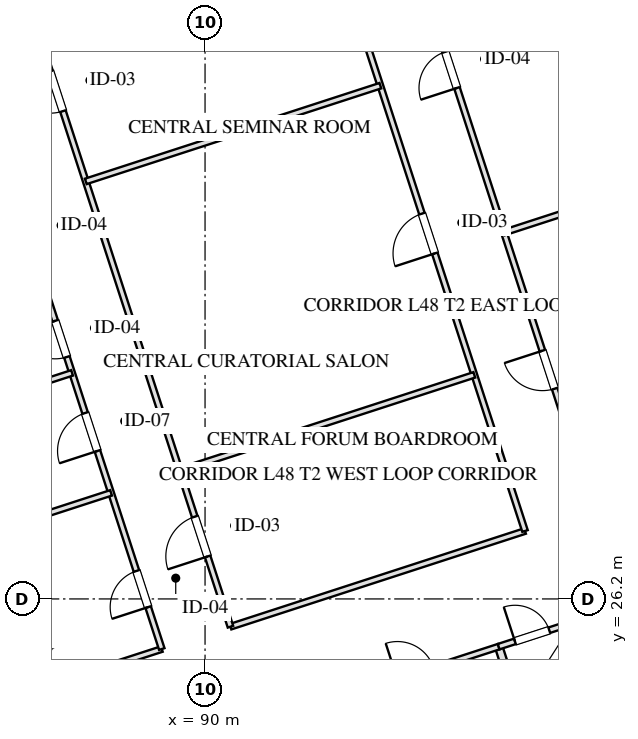
"""IFC4 building model, lengths in metres.
Left out: names, types, materials, properties, quantities, classifications, styles, units other than length and angle.
Written with IfcOpenShell. Run it as: python <this file> out.ifc"""

import sys

from ifc_helpers import new_model, si_unit, direction, frame, frame_2d, origin, place, context, subcontext, project, spatial, rectangle, extrude, element, fill, save


model = new_model("IFC4")
c1 = context("Model", 3, precision=1e-05, world=origin(), true_north=direction((0.0, 1.0)))
c2 = subcontext(c1, "Body", "Model", "MODEL_VIEW")
j1 = project(units=[si_unit("LENGTHUNIT", "METRE"), si_unit("PLANEANGLEUNIT", "RADIAN")], contexts=[c1])
p1 = place(None, origin())
s1 = spatial("IfcSite", under=j1, at=p1, CompositionType="ELEMENT")
p2 = place(p1, origin())
s2 = spatial("IfcBuilding", under=s1, at=p2, CompositionType="ELEMENT")
p3 = place(p2, frame((0.0, 0.0, 180.55)))
s3 = spatial("IfcBuildingStorey", under=s2, at=p3, CompositionType="ELEMENT", Elevation=180.55)
p4 = place(p3, frame((98.224, 59.173, 0.0), z_axis=(0.0, 0.0, 1.0), x_axis=(0.309014228706, -0.951057414911, 0.0)))
e1 = element("IfcWall", 1, at=p4, inside=s3, PredefinedType="SOLIDWALL", context=c2, shape_type="SweptSolid", body=[
    extrude(rectangle(XDim=42.8, YDim=0.4, at=frame_2d((21.4, 0.0))), origin(), (0.0, 0.0, 1.0), 2.55),
])
p5 = place(p4, frame((26.75, 0.0, 0.75)))
e2 = element("IfcOpeningElement", 2, at=p5, cuts=e1, PredefinedType="OPENING", context=c2, shape_type="SweptSolid", body=[
    extrude(rectangle(XDim=2.1, YDim=1.4, at=frame_2d((1.05, 0.7))), frame((0.0, 0.21, 0.0), z_axis=(0.0, -1.0, 0.0), x_axis=(1.0, 0.0, 0.0)), (0.0, 0.0, 1.0), 0.42),
])
p6 = place(p4, frame((22.95, 0.0, 0.75)))
e3 = element("IfcOpeningElement", 3, at=p6, cuts=e1, PredefinedType="OPENING", context=c2, shape_type="SweptSolid", body=[
    extrude(rectangle(XDim=2.1, YDim=1.4, at=frame_2d((1.05, 0.7))), frame((0.0, 0.21, 0.0), z_axis=(0.0, -1.0, 0.0), x_axis=(1.0, 0.0, 0.0)), (0.0, 0.0, 1.0), 0.42),
])
p7 = place(p4, frame((17.75, 0.0, 0.75)))
e4 = element("IfcOpeningElement", 4, at=p7, cuts=e1, PredefinedType="OPENING", context=c2, shape_type="SweptSolid", body=[
    extrude(rectangle(XDim=2.1, YDim=1.4, at=frame_2d((1.05, 0.7))), frame((0.0, 0.21, 0.0), z_axis=(0.0, -1.0, 0.0), x_axis=(1.0, 0.0, 0.0)), (0.0, 0.0, 1.0), 0.42),
])
p8 = place(p4, frame((13.95, 0.0, 0.75)))
e5 = element("IfcOpeningElement", 5, at=p8, cuts=e1, PredefinedType="OPENING", context=c2, shape_type="SweptSolid", body=[
    extrude(rectangle(XDim=2.1, YDim=1.4, at=frame_2d((1.05, 0.7))), frame((0.0, 0.21, 0.0), z_axis=(0.0, -1.0, 0.0), x_axis=(1.0, 0.0, 0.0)), (0.0, 0.0, 1.0), 0.42),
])
p9 = place(p3, frame((97.727, 24.944, 0.0), z_axis=(0.0, 0.0, 1.0), x_axis=(0.309016001439, -0.951056838919, 0.0)))
e6 = element("IfcWall", 6, at=p9, inside=s3, PredefinedType="PARTITIONING", context=c2, shape_type="SweptSolid", body=[
    extrude(rectangle(XDim=8.43, YDim=0.2, at=frame_2d((4.215, 0.0))), origin(), (0.0, 0.0, 1.0), 3.155),
])
p10 = place(p3, frame((93.542, 23.585, 0.0), z_axis=(0.0, 0.0, 1.0), x_axis=(0.951063829732, 0.308994485023, 0.0)))
e7 = element("IfcWall", 7, at=p10, inside=s3, PredefinedType="PARTITIONING", context=c2, shape_type="SweptSolid", body=[
    extrude(rectangle(XDim=4.4, YDim=0.15, at=frame_2d((2.2, 0.0))), origin(), (0.0, 0.0, 1.0), 3.155),
])
p11 = place(p10, frame((1.6, 0.0, 0.0)))
e8 = element("IfcOpeningElement", 8, at=p11, cuts=e7, PredefinedType="OPENING", context=c2, shape_type="SweptSolid", body=[
    extrude(rectangle(XDim=1.0, YDim=2.05, at=frame_2d((0.5, 1.025))), frame((0.0, 0.085, 0.0), z_axis=(0.0, -1.0, 0.0), x_axis=(1.0, 0.0, 0.0)), (0.0, 0.0, 1.0), 0.17),
])
p12 = place(p3, frame((97.727, 24.944, 0.0), z_axis=(0.0, 0.0, 1.0), x_axis=(0.951036872128, 0.309077446369, 0.0)))
e9 = element("IfcWall", 9, at=p12, inside=s3, PredefinedType="PARTITIONING", context=c2, shape_type="SweptSolid", body=[
    extrude(rectangle(XDim=3.2, YDim=0.15, at=frame_2d((1.6, 0.0))), origin(), (0.0, 0.0, 1.0), 3.155),
])
p13 = place(p12, frame((0.45, 0.0, 0.0)))
e10 = element("IfcOpeningElement", 10, at=p13, cuts=e9, PredefinedType="OPENING", context=c2, shape_type="SweptSolid", body=[
    extrude(rectangle(XDim=0.95, YDim=2.05, at=frame_2d((0.475, 1.025))), frame((0.0, 0.085, 0.0), z_axis=(0.0, -1.0, 0.0), x_axis=(1.0, 0.0, 0.0)), (0.0, 0.0, 1.0), 0.17),
])
p14 = place(p3, frame((77.925, 21.328, 0.0), z_axis=(0.0, 0.0, 1.0), x_axis=(0.951054972381, 0.309021746015, 0.0)))
e11 = element("IfcWall", 11, at=p14, inside=s3, PredefinedType="PARTITIONING", context=c2, shape_type="SweptSolid", body=[
    extrude(rectangle(XDim=11.5, YDim=0.15, at=frame_2d((5.75, 0.0))), origin(), (0.0, 0.0, 1.0), 3.155),
])
p15 = place(p3, frame((90.669, 25.469, 0.0), z_axis=(0.0, 0.0, 1.0), x_axis=(0.95106136293, 0.309002077568, 0.0)))
e12 = element("IfcWall", 12, at=p15, inside=s3, PredefinedType="PARTITIONING", context=c2, shape_type="SweptSolid", body=[
    extrude(rectangle(XDim=8.15, YDim=0.15, at=frame_2d((4.075, 0.0))), origin(), (0.0, 0.0, 1.0), 3.155),
])
p16 = place(p3, frame((88.862, 24.882, 0.0), z_axis=(0.0, 0.0, 1.0), x_axis=(-0.309008771245, 0.951059188113, 0.0)))
e13 = element("IfcWall", 13, at=p16, inside=s3, PredefinedType="PARTITIONING", context=c2, shape_type="SweptSolid", body=[
    extrude(rectangle(XDim=16.64, YDim=0.15, at=frame_2d((8.32, 0.0))), origin(), (0.0, 0.0, 1.0), 3.155),
])
p17 = place(p16, frame((1.16, 0.0, 0.0)))
e14 = element("IfcOpeningElement", 14, at=p17, cuts=e13, PredefinedType="OPENING", context=c2, shape_type="SweptSolid", body=[
    extrude(rectangle(XDim=1.0, YDim=2.05, at=frame_2d((0.5, 1.025))), frame((0.0, 0.085, 0.0), z_axis=(0.0, -1.0, 0.0), x_axis=(1.0, 0.0, 0.0)), (0.0, 0.0, 1.0), 0.17),
])
p18 = place(p16, frame((5.48, 0.0, 0.0)))
e15 = element("IfcOpeningElement", 15, at=p18, cuts=e13, PredefinedType="OPENING", context=c2, shape_type="SweptSolid", body=[
    extrude(rectangle(XDim=1.05, YDim=2.05, at=frame_2d((0.525, 1.025))), frame((0.0, 0.085, 0.0), z_axis=(0.0, -1.0, 0.0), x_axis=(1.0, 0.0, 0.0)), (0.0, 0.0, 1.0), 0.17),
])
p19 = place(p16, frame((8.08, 0.0, 0.0)))
e16 = element("IfcOpeningElement", 16, at=p19, cuts=e13, PredefinedType="OPENING", context=c2, shape_type="SweptSolid", body=[
    extrude(rectangle(XDim=1.0, YDim=2.05, at=frame_2d((0.5, 1.025))), frame((0.0, 0.085, 0.0), z_axis=(0.0, -1.0, 0.0), x_axis=(1.0, 0.0, 0.0)), (0.0, 0.0, 1.0), 0.17),
])
p20 = place(p16, frame((10.92, 0.0, 0.0)))
e17 = element("IfcOpeningElement", 17, at=p20, cuts=e13, PredefinedType="OPENING", context=c2, shape_type="SweptSolid", body=[
    extrude(rectangle(XDim=1.0, YDim=2.05, at=frame_2d((0.5, 1.025))), frame((0.0, 0.085, 0.0), z_axis=(0.0, -1.0, 0.0), x_axis=(1.0, 0.0, 0.0)), (0.0, 0.0, 1.0), 0.17),
])
p21 = place(p16, frame((14.48, 0.0, 0.0)))
e18 = element("IfcOpeningElement", 18, at=p21, cuts=e13, PredefinedType="OPENING", context=c2, shape_type="SweptSolid", body=[
    extrude(rectangle(XDim=0.85, YDim=2.05, at=frame_2d((0.425, 1.025))), frame((0.0, 0.085, 0.0), z_axis=(0.0, -1.0, 0.0), x_axis=(1.0, 0.0, 0.0)), (0.0, 0.0, 1.0), 0.17),
])
p22 = place(p3, frame((90.669, 25.469, 0.0), z_axis=(0.0, 0.0, 1.0), x_axis=(-0.309022042254, 0.951054876125, 0.0)))
e19 = element("IfcWall", 19, at=p22, inside=s3, PredefinedType="PARTITIONING", context=c2, shape_type="SweptSolid", body=[
    extrude(rectangle(XDim=16.64, YDim=0.15, at=frame_2d((8.32, 0.0))), origin(), (0.0, 0.0, 1.0), 3.155),
])
p23 = place(p22, frame((1.944, 0.0, 0.0)))
e20 = element("IfcOpeningElement", 20, at=p23, cuts=e19, PredefinedType="OPENING", context=c2, shape_type="SweptSolid", body=[
    extrude(rectangle(XDim=1.1, YDim=2.05, at=frame_2d((0.55, 1.025))), frame((0.0, 0.085, 0.0), z_axis=(0.0, -1.0, 0.0), x_axis=(1.0, 0.0, 0.0)), (0.0, 0.0, 1.0), 0.17),
])
p24 = place(p22, frame((14.264, 0.0, 0.0)))
e21 = element("IfcOpeningElement", 21, at=p24, cuts=e19, PredefinedType="OPENING", context=c2, shape_type="SweptSolid", body=[
    extrude(rectangle(XDim=1.1, YDim=2.05, at=frame_2d((0.55, 1.025))), frame((0.0, 0.085, 0.0), z_axis=(0.0, -1.0, 0.0), x_axis=(1.0, 0.0, 0.0)), (0.0, 0.0, 1.0), 0.17),
])
p25 = place(p3, frame((98.42, 27.988, 0.0), z_axis=(0.0, 0.0, 1.0), x_axis=(-0.309004459387, 0.951060589068, 0.0)))
e22 = element("IfcWall", 22, at=p25, inside=s3, PredefinedType="PARTITIONING", context=c2, shape_type="SweptSolid", body=[
    extrude(rectangle(XDim=16.64, YDim=0.15, at=frame_2d((8.32, 0.0))), origin(), (0.0, 0.0, 1.0), 3.155),
])
p26 = place(p25, frame((7.68, 0.0, 0.0)))
e23 = element("IfcOpeningElement", 23, at=p26, cuts=e22, PredefinedType="OPENING", context=c2, shape_type="SweptSolid", body=[
    extrude(rectangle(XDim=1.1, YDim=2.05, at=frame_2d((0.55, 1.025))), frame((0.0, 0.085, 0.0), z_axis=(0.0, -1.0, 0.0), x_axis=(1.0, 0.0, 0.0)), (0.0, 0.0, 1.0), 0.17),
])
p27 = place(p3, frame((100.227, 28.575, 0.0), z_axis=(0.0, 0.0, 1.0), x_axis=(-0.30901773025, 0.951056277195, 0.0)))
e24 = element("IfcWall", 24, at=p27, inside=s3, PredefinedType="PARTITIONING", context=c2, shape_type="SweptSolid", body=[
    extrude(rectangle(XDim=16.64, YDim=0.15, at=frame_2d((8.32, 0.0))), origin(), (0.0, 0.0, 1.0), 3.155),
])
p28 = place(p27, frame((3.32, 0.0, 0.0)))
e25 = element("IfcOpeningElement", 25, at=p28, cuts=e24, PredefinedType="OPENING", context=c2, shape_type="SweptSolid", body=[
    extrude(rectangle(XDim=1.05, YDim=2.05, at=frame_2d((0.525, 1.025))), frame((0.0, 0.085, 0.0), z_axis=(0.0, -1.0, 0.0), x_axis=(1.0, 0.0, 0.0)), (0.0, 0.0, 1.0), 0.17),
])
p29 = place(p27, frame((11.64, 0.0, 0.0)))
e26 = element("IfcOpeningElement", 26, at=p29, cuts=e24, PredefinedType="OPENING", context=c2, shape_type="SweptSolid", body=[
    extrude(rectangle(XDim=1.0, YDim=2.05, at=frame_2d((0.5, 1.025))), frame((0.0, 0.085, 0.0), z_axis=(0.0, -1.0, 0.0), x_axis=(1.0, 0.0, 0.0)), (0.0, 0.0, 1.0), 0.17),
])
p30 = place(p3, frame((89.334, 29.578, 0.0), z_axis=(0.0, 0.0, 1.0), x_axis=(0.951052558989, 0.309029173445, 0.0)))
e27 = element("IfcWall", 27, at=p30, inside=s3, PredefinedType="PARTITIONING", context=c2, shape_type="SweptSolid", body=[
    extrude(rectangle(XDim=8.15, YDim=0.15, at=frame_2d((4.075, 0.0))), origin(), (0.0, 0.0, 1.0), 3.155),
])
p31 = place(p3, frame((86.862, 37.186, 0.0), z_axis=(0.0, 0.0, 1.0), x_axis=(0.95106422313, 0.308993274169, 0.0)))
e28 = element("IfcWall", 28, at=p31, inside=s3, PredefinedType="PARTITIONING", context=c2, shape_type="SweptSolid", body=[
    extrude(rectangle(XDim=8.15, YDim=0.15, at=frame_2d((4.075, 0.0))), origin(), (0.0, 0.0, 1.0), 3.155),
])
for number, where, z_axis, x_axis in (
    (29, (76.59, 25.437, 0.0), (0.0, 0.0, 1.0), (0.951, 0.309, 0.0)),
    (30, (75.564, 28.594, 0.0), (0.0, 0.0, 1.0), (0.951, 0.309, 0.0)),
):
    element("IfcWall", number, at=place(p3, frame(where, z_axis=z_axis, x_axis=x_axis)), inside=s3, PredefinedType="PARTITIONING", context=c2, shape_type="SweptSolid", body=[
        extrude(rectangle(XDim=11.5, YDim=0.15, at=frame_2d((5.75, 0.0))), origin(), (0.0, 0.0, 1.0), 3.155),
    ])
p32 = place(p3, frame((97.866, 35.841, 0.0), z_axis=(0.0, 0.0, 1.0), x_axis=(0.95105749975, 0.309013967595, 0.0)))
e31 = element("IfcWall", 31, at=p32, inside=s3, PredefinedType="PARTITIONING", context=c2, shape_type="SweptSolid", body=[
    extrude(rectangle(XDim=7.35, YDim=0.15, at=frame_2d((3.675, 0.0))), origin(), (0.0, 0.0, 1.0), 3.155),
])
p33 = place(p13, origin())
e32 = element("IfcDoor", 32, at=p33, inside=s3, OperationType="SINGLE_SWING_LEFT", PredefinedType="DOOR", context=c2, shape_type="SweptSolid", body=[
    extrude(rectangle(XDim=0.95, YDim=2.05, at=frame_2d((0.475, 1.025))), frame((0.0, 0.025, 0.0), z_axis=(0.0, -1.0, 0.0), x_axis=(1.0, 0.0, 0.0)), (0.0, 0.0, 1.0), 0.05),
])
fill(e10, e32)
p34 = place(p17, origin())
e33 = element("IfcDoor", 33, at=p34, inside=s3, OperationType="SINGLE_SWING_LEFT", PredefinedType="DOOR", context=c2, shape_type="SweptSolid", body=[
    extrude(rectangle(XDim=1.0, YDim=2.05, at=frame_2d((0.5, 1.025))), frame((0.0, 0.025, 0.0), z_axis=(0.0, -1.0, 0.0), x_axis=(1.0, 0.0, 0.0)), (0.0, 0.0, 1.0), 0.05),
])
fill(e14, e33)
p35 = place(p18, origin())
e34 = element("IfcDoor", 34, at=p35, inside=s3, OperationType="SINGLE_SWING_LEFT", PredefinedType="DOOR", context=c2, shape_type="SweptSolid", body=[
    extrude(rectangle(XDim=1.05, YDim=2.05, at=frame_2d((0.525, 1.025))), frame((0.0, 0.025, 0.0), z_axis=(0.0, -1.0, 0.0), x_axis=(1.0, 0.0, 0.0)), (0.0, 0.0, 1.0), 0.05),
])
fill(e15, e34)
p36 = place(p19, origin())
e35 = element("IfcDoor", 35, at=p36, inside=s3, OperationType="SINGLE_SWING_RIGHT", PredefinedType="DOOR", context=c2, shape_type="SweptSolid", body=[
    extrude(rectangle(XDim=1.0, YDim=2.05, at=frame_2d((0.5, 1.025))), frame((0.0, 0.025, 0.0), z_axis=(0.0, -1.0, 0.0), x_axis=(1.0, 0.0, 0.0)), (0.0, 0.0, 1.0), 0.05),
])
fill(e16, e35)
p37 = place(p23, origin())
e36 = element("IfcDoor", 36, at=p37, inside=s3, OperationType="SINGLE_SWING_LEFT", PredefinedType="DOOR", context=c2, shape_type="SweptSolid", body=[
    extrude(rectangle(XDim=1.1, YDim=2.05, at=frame_2d((0.55, 1.025))), frame((0.0, 0.025, 0.0), z_axis=(0.0, -1.0, 0.0), x_axis=(1.0, 0.0, 0.0)), (0.0, 0.0, 1.0), 0.05),
])
fill(e20, e36)
p38 = place(p24, origin())
e37 = element("IfcDoor", 37, at=p38, inside=s3, OperationType="SINGLE_SWING_RIGHT", PredefinedType="DOOR", context=c2, shape_type="SweptSolid", body=[
    extrude(rectangle(XDim=1.1, YDim=2.05, at=frame_2d((0.55, 1.025))), frame((0.0, 0.025, 0.0), z_axis=(0.0, -1.0, 0.0), x_axis=(1.0, 0.0, 0.0)), (0.0, 0.0, 1.0), 0.05),
])
fill(e21, e37)
p39 = place(p26, origin())
e38 = element("IfcDoor", 38, at=p39, inside=s3, OperationType="SINGLE_SWING_LEFT", PredefinedType="DOOR", context=c2, shape_type="SweptSolid", body=[
    extrude(rectangle(XDim=1.1, YDim=2.05, at=frame_2d((0.55, 1.025))), frame((0.0, 0.025, 0.0), z_axis=(0.0, -1.0, 0.0), x_axis=(1.0, 0.0, 0.0)), (0.0, 0.0, 1.0), 0.05),
])
fill(e23, e38)
p40 = place(p28, origin())
e39 = element("IfcDoor", 39, at=p40, inside=s3, OperationType="SINGLE_SWING_RIGHT", PredefinedType="DOOR", context=c2, shape_type="SweptSolid", body=[
    extrude(rectangle(XDim=1.05, YDim=2.05, at=frame_2d((0.525, 1.025))), frame((0.0, 0.025, 0.0), z_axis=(0.0, -1.0, 0.0), x_axis=(1.0, 0.0, 0.0)), (0.0, 0.0, 1.0), 0.05),
])
fill(e25, e39)
p41 = place(p29, origin())
e40 = element("IfcDoor", 40, at=p41, inside=s3, OperationType="SINGLE_SWING_LEFT", PredefinedType="DOOR", context=c2, shape_type="SweptSolid", body=[
    extrude(rectangle(XDim=1.0, YDim=2.05, at=frame_2d((0.5, 1.025))), frame((0.0, 0.025, 0.0), z_axis=(0.0, -1.0, 0.0), x_axis=(1.0, 0.0, 0.0)), (0.0, 0.0, 1.0), 0.05),
])
fill(e26, e40)
save(model, sys.argv[1])
